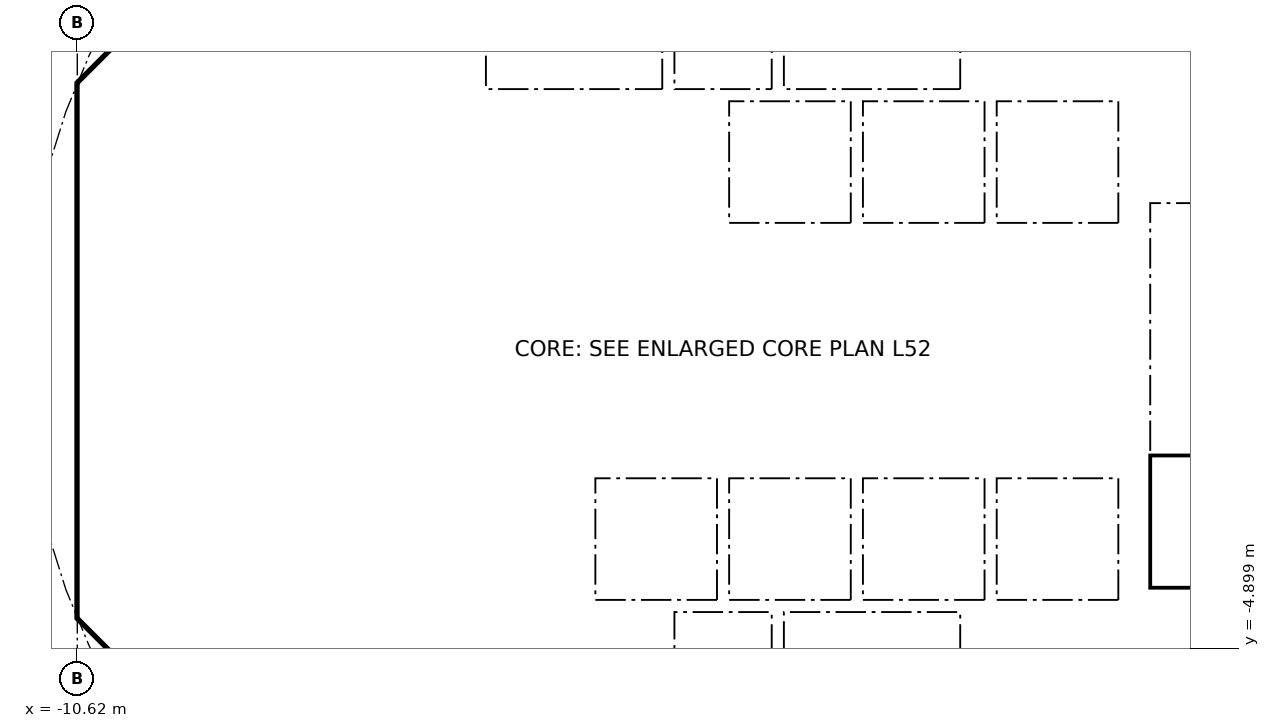
"""IFC4 building model, lengths in metres.
Left out: names, types, materials, properties, quantities, classifications, styles, units other than length and angle.
Written with IfcOpenShell. Run it as: python <this file> out.ifc"""

import sys

from ifc_helpers import new_model, si_unit, direction, frame, frame_2d, origin, place, context, subcontext, project, spatial, polyline, rectangle, outline, extrude, element, fill, save


model = new_model("IFC4")
c1 = context("Model", 3, precision=1e-05, world=origin(), true_north=direction((0.0, 1.0)))
c2 = subcontext(c1, "Body", "Model", "MODEL_VIEW")
j1 = project(units=[si_unit("LENGTHUNIT", "METRE"), si_unit("PLANEANGLEUNIT", "RADIAN")], contexts=[c1])
p1 = place(None, origin())
s1 = spatial("IfcSite", under=j1, at=p1, CompositionType="ELEMENT")
p2 = place(p1, origin())
s2 = spatial("IfcBuilding", under=s1, at=p2, CompositionType="ELEMENT")
p3 = place(p2, frame((0.0, 0.0, 206.6)))
s3 = spatial("IfcBuildingStorey", under=s2, at=p3, CompositionType="ELEMENT", Elevation=206.6)
p4 = place(p3, frame((9.988, 4.613, 0.0), z_axis=(0.0, 0.0, 1.0), x_axis=(-0.707106781187, 0.707106781187, 0.0)))
e1 = element("IfcWall", 1, at=p4, inside=s3, PredefinedType="SHEAR", context=c2, shape_type="SweptSolid", body=[
    extrude(rectangle(XDim=7.602, YDim=0.6, at=frame_2d((3.801, 0.0))), origin(), (0.0, 0.0, 1.0), 5.34),
])
p5 = place(p4, frame((3.201, 0.0, 0.0)))
e2 = element("IfcOpeningElement", 2, at=p5, cuts=e1, PredefinedType="OPENING", context=c2, shape_type="SweptSolid", body=[
    extrude(rectangle(XDim=1.2, YDim=2.1, at=frame_2d((0.6, 1.05))), frame((0.0, 0.31, 0.0), z_axis=(0.0, -1.0, 0.0), x_axis=(1.0, 0.0, 0.0)), (0.0, 0.0, 1.0), 0.62),
])
p6 = place(p3, frame((-4.613, 9.988, 0.0), z_axis=(0.0, 0.0, 1.0), x_axis=(-0.707106781187, -0.707106781187, 0.0)))
e3 = element("IfcWall", 3, at=p6, inside=s3, PredefinedType="SHEAR", context=c2, shape_type="SweptSolid", body=[
    extrude(rectangle(XDim=7.602, YDim=0.6, at=frame_2d((3.801, 0.0))), origin(), (0.0, 0.0, 1.0), 5.34),
])
p7 = place(p6, frame((0.351, 0.0, 0.0)))
e4 = element("IfcOpeningElement", 4, at=p7, cuts=e3, PredefinedType="OPENING", context=c2, shape_type="SweptSolid", body=[
    extrude(rectangle(XDim=1.1, YDim=2.1, at=frame_2d((0.55, 1.05))), frame((0.0, 0.31, 0.0), z_axis=(0.0, -1.0, 0.0), x_axis=(1.0, 0.0, 0.0)), (0.0, 0.0, 1.0), 0.62),
])
p8 = place(p3, frame((-10.325, 3.801, 0.0), z_axis=(0.0, 0.0, 1.0), x_axis=(0.0, -1.0, 0.0)))
e5 = element("IfcWall", 5, at=p8, inside=s3, PredefinedType="SHEAR", context=c2, shape_type="SweptSolid", body=[
    extrude(rectangle(XDim=7.602, YDim=0.6, at=frame_2d((3.801, 0.0))), origin(), (0.0, 0.0, 1.0), 5.34),
])
p9 = place(p8, frame((0.651, 0.0, 0.0)))
e6 = element("IfcOpeningElement", 6, at=p9, cuts=e5, PredefinedType="OPENING", context=c2, shape_type="SweptSolid", body=[
    extrude(rectangle(XDim=1.5, YDim=2.1, at=frame_2d((0.75, 1.05))), frame((0.0, 0.31, 0.0), z_axis=(0.0, -1.0, 0.0), x_axis=(1.0, 0.0, 0.0)), (0.0, 0.0, 1.0), 0.62),
])
p10 = place(p8, frame((5.451, 0.0, 0.0)))
e7 = element("IfcOpeningElement", 7, at=p10, cuts=e5, PredefinedType="OPENING", context=c2, shape_type="SweptSolid", body=[
    extrude(rectangle(XDim=1.5, YDim=2.1, at=frame_2d((0.75, 1.05))), frame((0.0, 0.31, 0.0), z_axis=(0.0, -1.0, 0.0), x_axis=(1.0, 0.0, 0.0)), (0.0, 0.0, 1.0), 0.62),
])
p11 = place(p3, frame((-9.988, -4.613, 0.0), z_axis=(0.0, 0.0, 1.0), x_axis=(0.707106781187, -0.707106781187, 0.0)))
e8 = element("IfcWall", 8, at=p11, inside=s3, PredefinedType="SHEAR", context=c2, shape_type="SweptSolid", body=[
    extrude(rectangle(XDim=7.602, YDim=0.6, at=frame_2d((3.801, 0.0))), origin(), (0.0, 0.0, 1.0), 5.34),
])
p12 = place(p11, frame((6.151, 0.0, 0.0)))
e9 = element("IfcOpeningElement", 9, at=p12, cuts=e8, PredefinedType="OPENING", context=c2, shape_type="SweptSolid", body=[
    extrude(rectangle(XDim=1.1, YDim=2.1, at=frame_2d((0.55, 1.05))), frame((0.0, 0.31, 0.0), z_axis=(0.0, -1.0, 0.0), x_axis=(1.0, 0.0, 0.0)), (0.0, 0.0, 1.0), 0.62),
])
p13 = place(p3, frame((4.613, -9.988, 0.0), z_axis=(0.0, 0.0, 1.0), x_axis=(0.707106781187, 0.707106781187, 0.0)))
e10 = element("IfcWall", 10, at=p13, inside=s3, PredefinedType="SHEAR", context=c2, shape_type="SweptSolid", body=[
    extrude(rectangle(XDim=7.602, YDim=0.6, at=frame_2d((3.801, 0.0))), origin(), (0.0, 0.0, 1.0), 5.34),
])
p14 = place(p13, frame((3.201, 0.0, 0.0)))
e11 = element("IfcOpeningElement", 11, at=p14, cuts=e10, PredefinedType="OPENING", context=c2, shape_type="SweptSolid", body=[
    extrude(rectangle(XDim=1.2, YDim=2.1, at=frame_2d((0.6, 1.05))), frame((0.0, 0.31, 0.0), z_axis=(0.0, -1.0, 0.0), x_axis=(1.0, 0.0, 0.0)), (0.0, 0.0, 1.0), 0.62),
])
p15 = place(p3, frame((-5.8, 4.3, 0.0), z_axis=(0.0, 0.0, 1.0), x_axis=(0.0, 1.0, 0.0)))
e12 = element("IfcWall", 12, at=p15, inside=s3, PredefinedType="PARTITIONING", context=c2, shape_type="SweptSolid", body=[
    extrude(rectangle(XDim=3.927, YDim=0.15, at=frame_2d((1.963, 0.0))), origin(), (0.0, 0.0, 1.0), 5.34),
])
p16 = place(p15, frame((1.551, 0.0, 0.0)))
e13 = element("IfcOpeningElement", 13, at=p16, cuts=e12, PredefinedType="OPENING", context=c2, shape_type="SweptSolid", body=[
    extrude(rectangle(XDim=0.9, YDim=2.1, at=frame_2d((0.45, 1.05))), frame((0.0, 0.085, 0.0), z_axis=(0.0, -1.0, 0.0), x_axis=(1.0, 0.0, 0.0)), (0.0, 0.0, 1.0), 0.17),
])
p17 = place(p3, frame((4.0, 4.3, 0.0), z_axis=(0.0, 0.0, 1.0), x_axis=(0.0, 1.0, 0.0)))
e14 = element("IfcWall", 14, at=p17, inside=s3, PredefinedType="SOLIDWALL", context=c2, shape_type="SweptSolid", body=[
    extrude(rectangle(XDim=2.2, YDim=0.2, at=frame_2d((1.1, 0.0))), origin(), (0.0, 0.0, 1.0), 5.34),
])
p18 = place(p17, frame((0.55, 0.0, 0.0)))
e15 = element("IfcOpeningElement", 15, at=p18, cuts=e14, PredefinedType="OPENING", context=c2, shape_type="SweptSolid", body=[
    extrude(rectangle(XDim=1.1, YDim=2.1, at=frame_2d((0.55, 1.05))), frame((0.0, 0.11, 0.0), z_axis=(0.0, -1.0, 0.0), x_axis=(1.0, 0.0, 0.0)), (0.0, 0.0, 1.0), 0.22),
])
p19 = place(p3, frame((-4.0, 4.3, 0.0), z_axis=(0.0, 0.0, 1.0), x_axis=(0.0, 1.0, 0.0)))
e16 = element("IfcWall", 16, at=p19, inside=s3, PredefinedType="SOLIDWALL", context=c2, shape_type="SweptSolid", body=[
    extrude(rectangle(XDim=2.2, YDim=0.2, at=frame_2d((1.1, 0.0))), origin(), (0.0, 0.0, 1.0), 5.34),
])
p20 = place(p19, frame((0.55, 0.0, 0.0)))
e17 = element("IfcOpeningElement", 17, at=p20, cuts=e16, PredefinedType="OPENING", context=c2, shape_type="SweptSolid", body=[
    extrude(rectangle(XDim=1.1, YDim=2.1, at=frame_2d((0.55, 1.05))), frame((0.0, 0.11, 0.0), z_axis=(0.0, -1.0, 0.0), x_axis=(1.0, 0.0, 0.0)), (0.0, 0.0, 1.0), 0.22),
])
p21 = place(p3, frame((-6.7, 2.0, 0.0), z_axis=(0.0, 0.0, 1.0), x_axis=(1.0, 0.0, 0.0)))
e18 = element("IfcWall", 18, at=p21, inside=s3, PredefinedType="SOLIDWALL", context=c2, shape_type="SweptSolid", body=[
    extrude(rectangle(XDim=13.4, YDim=0.2, at=frame_2d((6.7, 0.0))), origin(), (0.0, 0.0, 1.0), 5.34),
])
p22 = place(p21, frame((7.25, 0.0, 0.0)))
e19 = element("IfcOpeningElement", 19, at=p22, cuts=e18, PredefinedType="OPENING", context=c2, shape_type="SweptSolid", body=[
    extrude(rectangle(XDim=1.1, YDim=2.1, at=frame_2d((0.55, 1.05))), frame((0.0, 0.11, 0.0), z_axis=(0.0, -1.0, 0.0), x_axis=(1.0, 0.0, 0.0)), (0.0, 0.0, 1.0), 0.22),
])
p23 = place(p21, frame((9.45, 0.0, 0.0)))
e20 = element("IfcOpeningElement", 20, at=p23, cuts=e18, PredefinedType="OPENING", context=c2, shape_type="SweptSolid", body=[
    extrude(rectangle(XDim=1.1, YDim=2.1, at=frame_2d((0.55, 1.05))), frame((0.0, 0.11, 0.0), z_axis=(0.0, -1.0, 0.0), x_axis=(1.0, 0.0, 0.0)), (0.0, 0.0, 1.0), 0.22),
])
p24 = place(p21, frame((0.75, 0.0, 0.0)))
e21 = element("IfcOpeningElement", 21, at=p24, cuts=e18, PredefinedType="OPENING", context=c2, shape_type="SweptSolid", body=[
    extrude(rectangle(XDim=0.9, YDim=2.1, at=frame_2d((0.45, 1.05))), frame((0.0, 0.11, 0.0), z_axis=(0.0, -1.0, 0.0), x_axis=(1.0, 0.0, 0.0)), (0.0, 0.0, 1.0), 0.22),
])
p25 = place(p21, frame((4.05, 0.0, 0.0)))
e22 = element("IfcOpeningElement", 22, at=p25, cuts=e18, PredefinedType="OPENING", context=c2, shape_type="SweptSolid", body=[
    extrude(rectangle(XDim=0.9, YDim=2.1, at=frame_2d((0.45, 1.05))), frame((0.0, 0.11, 0.0), z_axis=(0.0, -1.0, 0.0), x_axis=(1.0, 0.0, 0.0)), (0.0, 0.0, 1.0), 0.22),
])
p26 = place(p3, frame((6.7, 4.0, 0.0), z_axis=(0.0, 0.0, 1.0), x_axis=(1.0, 0.0, 0.0)))
e23 = element("IfcWall", 23, at=p26, inside=s3, PredefinedType="SOLIDWALL", context=c2, shape_type="SweptSolid", body=[
    extrude(rectangle(XDim=3.325, YDim=0.2, at=frame_2d((1.662, 0.0))), origin(), (0.0, 0.0, 1.0), 5.34),
])
p27 = place(p26, frame((1.25, 0.0, 0.0)))
e24 = element("IfcOpeningElement", 24, at=p27, cuts=e23, PredefinedType="OPENING", context=c2, shape_type="SweptSolid", body=[
    extrude(rectangle(XDim=1.1, YDim=2.1, at=frame_2d((0.55, 1.05))), frame((0.0, 0.11, 0.0), z_axis=(0.0, -1.0, 0.0), x_axis=(1.0, 0.0, 0.0)), (0.0, 0.0, 1.0), 0.22),
])
p28 = place(p3, frame((-5.8, -8.227, 0.0), z_axis=(0.0, 0.0, 1.0), x_axis=(0.0, 1.0, 0.0)))
e25 = element("IfcWall", 25, at=p28, inside=s3, PredefinedType="PARTITIONING", context=c2, shape_type="SweptSolid", body=[
    extrude(rectangle(XDim=3.927, YDim=0.15, at=frame_2d((1.963, 0.0))), origin(), (0.0, 0.0, 1.0), 5.34),
])
p29 = place(p28, frame((2.615, 0.0, 0.0)))
e26 = element("IfcOpeningElement", 26, at=p29, cuts=e25, PredefinedType="OPENING", context=c2, shape_type="SweptSolid", body=[
    extrude(rectangle(XDim=0.9, YDim=2.1, at=frame_2d((0.45, 1.05))), frame((0.0, 0.085, 0.0), z_axis=(0.0, -1.0, 0.0), x_axis=(1.0, 0.0, 0.0)), (0.0, 0.0, 1.0), 0.17),
])
p30 = place(p28, frame((0.539, 0.0, 0.0)))
e27 = element("IfcOpeningElement", 27, at=p30, cuts=e25, PredefinedType="OPENING", context=c2, shape_type="SweptSolid", body=[
    extrude(rectangle(XDim=0.9, YDim=2.1, at=frame_2d((0.45, 1.05))), frame((0.0, 0.085, 0.0), z_axis=(0.0, -1.0, 0.0), x_axis=(1.0, 0.0, 0.0)), (0.0, 0.0, 1.0), 0.17),
])
p31 = place(p3, frame((4.0, -6.5, 0.0), z_axis=(0.0, 0.0, 1.0), x_axis=(0.0, 1.0, 0.0)))
e28 = element("IfcWall", 28, at=p31, inside=s3, PredefinedType="SOLIDWALL", context=c2, shape_type="SweptSolid", body=[
    extrude(rectangle(XDim=2.2, YDim=0.2, at=frame_2d((1.1, 0.0))), origin(), (0.0, 0.0, 1.0), 5.34),
])
p32 = place(p31, frame((0.55, 0.0, 0.0)))
e29 = element("IfcOpeningElement", 29, at=p32, cuts=e28, PredefinedType="OPENING", context=c2, shape_type="SweptSolid", body=[
    extrude(rectangle(XDim=1.1, YDim=2.1, at=frame_2d((0.55, 1.05))), frame((0.0, 0.11, 0.0), z_axis=(0.0, -1.0, 0.0), x_axis=(1.0, 0.0, 0.0)), (0.0, 0.0, 1.0), 0.22),
])
p33 = place(p3, frame((-4.0, -6.5, 0.0), z_axis=(0.0, 0.0, 1.0), x_axis=(0.0, 1.0, 0.0)))
e30 = element("IfcWall", 30, at=p33, inside=s3, PredefinedType="SOLIDWALL", context=c2, shape_type="SweptSolid", body=[
    extrude(rectangle(XDim=2.2, YDim=0.2, at=frame_2d((1.1, 0.0))), origin(), (0.0, 0.0, 1.0), 5.34),
])
p34 = place(p33, frame((0.65, 0.0, 0.0)))
e31 = element("IfcOpeningElement", 31, at=p34, cuts=e30, PredefinedType="OPENING", context=c2, shape_type="SweptSolid", body=[
    extrude(rectangle(XDim=0.9, YDim=2.1, at=frame_2d((0.45, 1.05))), frame((0.0, 0.11, 0.0), z_axis=(0.0, -1.0, 0.0), x_axis=(1.0, 0.0, 0.0)), (0.0, 0.0, 1.0), 0.22),
])
p35 = place(p3, frame((-6.7, -2.0, 0.0), z_axis=(0.0, 0.0, 1.0), x_axis=(1.0, 0.0, 0.0)))
e32 = element("IfcWall", 32, at=p35, inside=s3, PredefinedType="SOLIDWALL", context=c2, shape_type="SweptSolid", body=[
    extrude(rectangle(XDim=13.4, YDim=0.2, at=frame_2d((6.7, 0.0))), origin(), (0.0, 0.0, 1.0), 5.34),
])
p36 = place(p35, frame((5.05, 0.0, 0.0)))
e33 = element("IfcOpeningElement", 33, at=p36, cuts=e32, PredefinedType="OPENING", context=c2, shape_type="SweptSolid", body=[
    extrude(rectangle(XDim=1.1, YDim=2.1, at=frame_2d((0.55, 1.05))), frame((0.0, 0.11, 0.0), z_axis=(0.0, -1.0, 0.0), x_axis=(1.0, 0.0, 0.0)), (0.0, 0.0, 1.0), 0.22),
])
p37 = place(p35, frame((7.25, 0.0, 0.0)))
e34 = element("IfcOpeningElement", 34, at=p37, cuts=e32, PredefinedType="OPENING", context=c2, shape_type="SweptSolid", body=[
    extrude(rectangle(XDim=1.1, YDim=2.1, at=frame_2d((0.55, 1.05))), frame((0.0, 0.11, 0.0), z_axis=(0.0, -1.0, 0.0), x_axis=(1.0, 0.0, 0.0)), (0.0, 0.0, 1.0), 0.22),
])
p38 = place(p35, frame((1.85, 0.0, 0.0)))
e35 = element("IfcOpeningElement", 35, at=p38, cuts=e32, PredefinedType="OPENING", context=c2, shape_type="SweptSolid", body=[
    extrude(rectangle(XDim=0.9, YDim=2.1, at=frame_2d((0.45, 1.05))), frame((0.0, 0.11, 0.0), z_axis=(0.0, -1.0, 0.0), x_axis=(1.0, 0.0, 0.0)), (0.0, 0.0, 1.0), 0.22),
])
p39 = place(p3, origin())
e36 = element("IfcWall", 36, at=p39, inside=s3, PredefinedType="SHEAR", context=c2, shape_type="SweptSolid", body=[
    extrude(outline(polyline([(-10.625, -3.801), (-10.025, -3.801), (-10.025, -4.152), (-9.776, -4.401), (-10.2, -4.825), (-10.625, -4.401), (-10.625, -3.801)])), origin(), (0.0, 0.0, 1.0), 5.34),
])
p40 = place(p3, origin())
e37 = element("IfcWall", 37, at=p40, inside=s3, PredefinedType="SHEAR", context=c2, shape_type="SweptSolid", body=[
    extrude(outline(polyline([(-10.2, 4.825), (-9.776, 4.401), (-10.025, 4.152), (-10.025, 3.801), (-10.625, 3.801), (-10.625, 4.401), (-10.2, 4.825)])), origin(), (0.0, 0.0, 1.0), 5.34),
])
for number, where, z_axis, x_axis in (
    (38, (-0.9, 4.3, 0.0), (0.0, 0.0, 1.0), (0.0, 1.0, 0.0)),
    (39, (0.9, 4.3, 0.0), (0.0, 0.0, 1.0), (0.0, 1.0, 0.0)),
):
    element("IfcWall", number, at=place(p3, frame(where, z_axis=z_axis, x_axis=x_axis)), inside=s3, PredefinedType="SOLIDWALL", context=c2, shape_type="SweptSolid", body=[
        extrude(rectangle(XDim=2.2, YDim=0.2, at=frame_2d((1.1, 0.0))), origin(), (0.0, 0.0, 1.0), 5.34),
    ])
p41 = place(p3, origin())
e40 = element("IfcWall", 40, at=p41, inside=s3, PredefinedType="SOLIDWALL", context=c2, shape_type="SweptSolid", body=[
    extrude(outline(polyline([(-6.7, 4.3), (6.7, 4.3), (6.7, 2.1), (6.5, 2.1), (6.5, 4.1), (4.5, 4.1), (4.5, 2.1), (4.3, 2.1), (4.3, 4.1), (2.3, 4.1), (2.3, 2.1), (2.1, 2.1), (2.1, 4.1), (0.1, 4.1), (0.1, 2.1), (-0.1, 2.1), (-0.1, 4.1), (-4.3, 4.1), (-4.3, 2.1), (-4.5, 2.1), (-4.5, 4.1), (-6.5, 4.1), (-6.5, 2.1), (-6.7, 2.1), (-6.7, 4.3)])), origin(), (0.0, 0.0, 1.0), 5.34),
])
for number, where, z_axis, x_axis in (
    (41, (-0.9, -6.5, 0.0), (0.0, 0.0, 1.0), (0.0, 1.0, 0.0)),
    (42, (0.9, -6.5, 0.0), (0.0, 0.0, 1.0), (0.0, 1.0, 0.0)),
):
    element("IfcWall", number, at=place(p3, frame(where, z_axis=z_axis, x_axis=x_axis)), inside=s3, PredefinedType="SOLIDWALL", context=c2, shape_type="SweptSolid", body=[
        extrude(rectangle(XDim=2.2, YDim=0.2, at=frame_2d((1.1, 0.0))), origin(), (0.0, 0.0, 1.0), 5.34),
    ])
p42 = place(p3, origin())
e43 = element("IfcWall", 43, at=p42, inside=s3, PredefinedType="SOLIDWALL", context=c2, shape_type="SweptSolid", body=[
    extrude(outline(polyline([(-6.7, -2.1), (-6.5, -2.1), (-6.5, -4.1), (-2.3, -4.1), (-2.3, -2.1), (-2.1, -2.1), (-2.1, -4.1), (-0.1, -4.1), (-0.1, -2.1), (0.1, -2.1), (0.1, -4.1), (2.1, -4.1), (2.1, -2.1), (2.3, -2.1), (2.3, -4.1), (4.3, -4.1), (4.3, -2.1), (4.5, -2.1), (4.5, -4.1), (6.5, -4.1), (6.5, -2.1), (6.7, -2.1), (6.7, -4.3), (-6.7, -4.3), (-6.7, -2.1)])), origin(), (0.0, 0.0, 1.0), 5.34),
])
for number, where, z_axis, x_axis in (
    (44, (-10.025, -4.0, 0.0), (0.0, 0.0, 1.0), (1.0, 0.0, 0.0)),
    (45, (-10.025, 4.0, 0.0), (0.0, 0.0, 1.0), (1.0, 0.0, 0.0)),
):
    element("IfcWall", number, at=place(p3, frame(where, z_axis=z_axis, x_axis=x_axis)), inside=s3, PredefinedType="PARTITIONING", context=c2, shape_type="SweptSolid", body=[
        extrude(rectangle(XDim=3.325, YDim=0.2, at=frame_2d((1.662, 0.0))), origin(), (0.0, 0.0, 1.0), 5.34),
    ])
p43 = place(p3, origin())
e46 = element("IfcWall", 46, at=p43, inside=s3, PredefinedType="SOLIDWALL", context=c2, shape_type="SweptSolid", body=[
    extrude(outline(polyline([(7.025, -3.9), (6.7, -3.9), (6.7, 3.9), (7.025, 3.9), (7.025, -3.9)])), origin(), (0.0, 0.0, 1.0), 5.34),
])
p44 = place(p3, origin())
e47 = element("IfcWall", 47, at=p44, inside=s3, PredefinedType="SOLIDWALL", context=c2, shape_type="SweptSolid", body=[
    extrude(outline(polyline([(10.025, -4.1), (6.7, -4.1), (6.7, -3.9), (10.025, -3.9), (10.025, -4.1)])), origin(), (0.0, 0.0, 1.0), 5.34),
])
p45 = place(p22, origin())
e48 = element("IfcDoor", 48, at=p45, inside=s3, OperationType="DOUBLE_DOOR_SLIDING", PredefinedType="DOOR", context=c2, shape_type="SweptSolid", body=[
    extrude(rectangle(XDim=1.1, YDim=2.1, at=frame_2d((0.55, 1.05))), frame((0.0, 0.025, 0.0), z_axis=(0.0, -1.0, 0.0), x_axis=(1.0, 0.0, 0.0)), (0.0, 0.0, 1.0), 0.05),
])
fill(e19, e48)
p46 = place(p23, origin())
e49 = element("IfcDoor", 49, at=p46, inside=s3, OperationType="DOUBLE_DOOR_SLIDING", PredefinedType="DOOR", context=c2, shape_type="SweptSolid", body=[
    extrude(rectangle(XDim=1.1, YDim=2.1, at=frame_2d((0.55, 1.05))), frame((0.0, 0.025, 0.0), z_axis=(0.0, -1.0, 0.0), x_axis=(1.0, 0.0, 0.0)), (0.0, 0.0, 1.0), 0.05),
])
fill(e20, e49)
p47 = place(p36, origin())
e50 = element("IfcDoor", 50, at=p47, inside=s3, OperationType="DOUBLE_DOOR_SLIDING", PredefinedType="DOOR", context=c2, shape_type="SweptSolid", body=[
    extrude(rectangle(XDim=1.1, YDim=2.1, at=frame_2d((0.55, 1.05))), frame((0.0, 0.025, 0.0), z_axis=(0.0, -1.0, 0.0), x_axis=(1.0, 0.0, 0.0)), (0.0, 0.0, 1.0), 0.05),
])
fill(e33, e50)
p48 = place(p37, origin())
e51 = element("IfcDoor", 51, at=p48, inside=s3, OperationType="DOUBLE_DOOR_SLIDING", PredefinedType="DOOR", context=c2, shape_type="SweptSolid", body=[
    extrude(rectangle(XDim=1.1, YDim=2.1, at=frame_2d((0.55, 1.05))), frame((0.0, 0.025, 0.0), z_axis=(0.0, -1.0, 0.0), x_axis=(1.0, 0.0, 0.0)), (0.0, 0.0, 1.0), 0.05),
])
fill(e34, e51)
p49 = place(p18, origin())
e52 = element("IfcDoor", 52, at=p49, inside=s3, OperationType="DOUBLE_DOOR_SLIDING", PredefinedType="DOOR", context=c2, shape_type="SweptSolid", body=[
    extrude(rectangle(XDim=1.1, YDim=2.1, at=frame_2d((0.55, 1.05))), frame((0.0, 0.025, 0.0), z_axis=(0.0, -1.0, 0.0), x_axis=(1.0, 0.0, 0.0)), (0.0, 0.0, 1.0), 0.05),
])
fill(e15, e52)
p50 = place(p32, origin())
e53 = element("IfcDoor", 53, at=p50, inside=s3, OperationType="DOUBLE_DOOR_SLIDING", PredefinedType="DOOR", context=c2, shape_type="SweptSolid", body=[
    extrude(rectangle(XDim=1.1, YDim=2.1, at=frame_2d((0.55, 1.05))), frame((0.0, 0.025, 0.0), z_axis=(0.0, -1.0, 0.0), x_axis=(1.0, 0.0, 0.0)), (0.0, 0.0, 1.0), 0.05),
])
fill(e29, e53)
p51 = place(p20, origin())
e54 = element("IfcDoor", 54, at=p51, inside=s3, OperationType="DOUBLE_DOOR_SLIDING", PredefinedType="DOOR", context=c2, shape_type="SweptSolid", body=[
    extrude(rectangle(XDim=1.1, YDim=2.1, at=frame_2d((0.55, 1.05))), frame((0.0, 0.025, 0.0), z_axis=(0.0, -1.0, 0.0), x_axis=(1.0, 0.0, 0.0)), (0.0, 0.0, 1.0), 0.05),
])
fill(e17, e54)
p52 = place(p29, origin())
e55 = element("IfcDoor", 55, at=p52, inside=s3, OperationType="SINGLE_SWING_RIGHT", PredefinedType="DOOR", context=c2, shape_type="SweptSolid", body=[
    extrude(rectangle(XDim=0.9, YDim=2.1, at=frame_2d((0.45, 1.05))), frame((0.0, 0.025, 0.0), z_axis=(0.0, -1.0, 0.0), x_axis=(1.0, 0.0, 0.0)), (0.0, 0.0, 1.0), 0.05),
])
fill(e26, e55)
p53 = place(p24, origin())
e56 = element("IfcDoor", 56, at=p53, inside=s3, OperationType="SINGLE_SWING_LEFT", PredefinedType="DOOR", context=c2, shape_type="SweptSolid", body=[
    extrude(rectangle(XDim=0.9, YDim=2.1, at=frame_2d((0.45, 1.05))), frame((0.0, 0.025, 0.0), z_axis=(0.0, -1.0, 0.0), x_axis=(1.0, 0.0, 0.0)), (0.0, 0.0, 1.0), 0.05),
])
fill(e21, e56)
p54 = place(p25, origin())
e57 = element("IfcDoor", 57, at=p54, inside=s3, OperationType="SINGLE_SWING_LEFT", PredefinedType="DOOR", context=c2, shape_type="SweptSolid", body=[
    extrude(rectangle(XDim=0.9, YDim=2.1, at=frame_2d((0.45, 1.05))), frame((0.0, 0.025, 0.0), z_axis=(0.0, -1.0, 0.0), x_axis=(1.0, 0.0, 0.0)), (0.0, 0.0, 1.0), 0.05),
])
fill(e22, e57)
p55 = place(p38, frame((0.9, 0.0, 0.0), x_axis=(-1.0, 0.0, 0.0)))
e58 = element("IfcDoor", 58, at=p55, inside=s3, OperationType="SINGLE_SWING_RIGHT", PredefinedType="DOOR", context=c2, shape_type="SweptSolid", body=[
    extrude(rectangle(XDim=0.9, YDim=2.1, at=frame_2d((0.45, 1.05))), frame((0.0, 0.025, 0.0), z_axis=(0.0, -1.0, 0.0), x_axis=(1.0, 0.0, 0.0)), (0.0, 0.0, 1.0), 0.05),
])
fill(e35, e58)
p56 = place(p9, origin())
e59 = element("IfcDoor", 59, at=p56, inside=s3, OperationType="DOUBLE_DOOR_SINGLE_SWING", PredefinedType="DOOR", context=c2, shape_type="SweptSolid", body=[
    extrude(rectangle(XDim=1.5, YDim=2.1, at=frame_2d((0.75, 1.05))), frame((0.0, 0.025, 0.0), z_axis=(0.0, -1.0, 0.0), x_axis=(1.0, 0.0, 0.0)), (0.0, 0.0, 1.0), 0.05),
])
fill(e6, e59)
p57 = place(p10, origin())
e60 = element("IfcDoor", 60, at=p57, inside=s3, OperationType="DOUBLE_DOOR_SINGLE_SWING", PredefinedType="DOOR", context=c2, shape_type="SweptSolid", body=[
    extrude(rectangle(XDim=1.5, YDim=2.1, at=frame_2d((0.75, 1.05))), frame((0.0, 0.025, 0.0), z_axis=(0.0, -1.0, 0.0), x_axis=(1.0, 0.0, 0.0)), (0.0, 0.0, 1.0), 0.05),
])
fill(e7, e60)
save(model, sys.argv[1])
